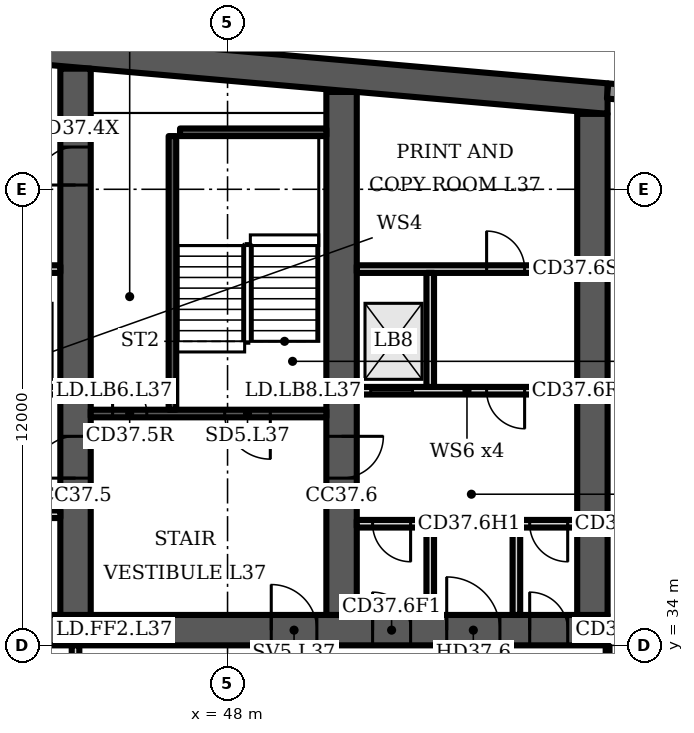
"""IFC4 building model, lengths in metres.
Left out: names, types, materials, properties, quantities, classifications, styles, units other than length and angle.
Written with IfcOpenShell. Run it as: python <this file> out.ifc"""

import sys

from ifc_helpers import new_model, si_unit, direction, frame, frame_2d, origin, place, context, subcontext, project, spatial, polyline, rectangle, outline, extrude, element, fill, save


model = new_model("IFC4")
c1 = context("Model", 3, precision=1e-05, world=origin(), true_north=direction((0.0, 1.0)))
c2 = subcontext(c1, "Body", "Model", "MODEL_VIEW")
j1 = project(units=[si_unit("LENGTHUNIT", "METRE"), si_unit("PLANEANGLEUNIT", "RADIAN")], contexts=[c1])
p1 = place(None, origin())
s1 = spatial("IfcSite", under=j1, at=p1, CompositionType="ELEMENT")
p2 = place(p1, origin())
s2 = spatial("IfcBuilding", under=s1, at=p2, CompositionType="ELEMENT")
p3 = place(p2, frame((0.0, 0.0, 155.5)))
s3 = spatial("IfcBuildingStorey", under=s2, at=p3, CompositionType="ELEMENT", Elevation=155.5)
p4 = place(p3, origin())
e1 = element("IfcWall", 1, at=p4, inside=s3, PredefinedType="SHEAR", context=c2, shape_type="SweptSolid", body=[
    extrude(outline(polyline([(16.0, 47.984), (37.0, 49.822), (58.0, 47.984), (58.0, 48.787), (37.0, 50.625), (16.0, 48.787), (16.0, 47.984)])), origin(), (0.0, 0.0, 1.0), 3.6),
])
p5 = place(p3, frame((16.0, 34.4, 0.0), z_axis=(0.0, 0.0, 1.0), x_axis=(1.0, 0.0, 0.0)))
e2 = element("IfcWall", 2, at=p5, inside=s3, PredefinedType="SHEAR", context=c2, shape_type="SweptSolid", body=[
    extrude(rectangle(XDim=42.0, YDim=0.8, at=frame_2d((21.0, 0.0))), origin(), (0.0, 0.0, 1.0), 3.6),
])
p6 = place(p5, frame((1.75, 0.0, 0.0)))
e3 = element("IfcOpeningElement", 3, at=p6, cuts=e2, PredefinedType="OPENING", context=c2, shape_type="SweptSolid", body=[
    extrude(rectangle(XDim=1.0, YDim=2.1, at=frame_2d((0.5, 1.05))), frame((0.0, 0.41, 0.0), z_axis=(0.0, -1.0, 0.0), x_axis=(1.0, 0.0, 0.0)), (0.0, 0.0, 1.0), 0.82),
])
p7 = place(p5, frame((4.65, 0.0, 0.0)))
e4 = element("IfcOpeningElement", 4, at=p7, cuts=e2, PredefinedType="OPENING", context=c2, shape_type="SweptSolid", body=[
    extrude(rectangle(XDim=1.0, YDim=2.1, at=frame_2d((0.5, 1.05))), frame((0.0, 0.41, 0.0), z_axis=(0.0, -1.0, 0.0), x_axis=(1.0, 0.0, 0.0)), (0.0, 0.0, 1.0), 0.82),
])
p8 = place(p5, frame((7.65, 0.0, 0.0)))
e5 = element("IfcOpeningElement", 5, at=p8, cuts=e2, PredefinedType="OPENING", context=c2, shape_type="SweptSolid", body=[
    extrude(rectangle(XDim=1.2, YDim=2.1, at=frame_2d((0.6, 1.05))), frame((0.0, 0.41, 0.0), z_axis=(0.0, -1.0, 0.0), x_axis=(1.0, 0.0, 0.0)), (0.0, 0.0, 1.0), 0.82),
])
p9 = place(p5, frame((14.767, 0.0, 0.0)))
e6 = element("IfcOpeningElement", 6, at=p9, cuts=e2, PredefinedType="OPENING", context=c2, shape_type="SweptSolid", body=[
    extrude(rectangle(XDim=1.1, YDim=2.1, at=frame_2d((0.55, 1.05))), frame((0.0, 0.41, 0.0), z_axis=(0.0, -1.0, 0.0), x_axis=(1.0, 0.0, 0.0)), (0.0, 0.0, 1.0), 0.82),
])
p10 = place(p5, frame((19.133, 0.0, 0.0)))
e7 = element("IfcOpeningElement", 7, at=p10, cuts=e2, PredefinedType="OPENING", context=c2, shape_type="SweptSolid", body=[
    extrude(rectangle(XDim=1.1, YDim=2.1, at=frame_2d((0.55, 1.05))), frame((0.0, 0.41, 0.0), z_axis=(0.0, -1.0, 0.0), x_axis=(1.0, 0.0, 0.0)), (0.0, 0.0, 1.0), 0.82),
])
p11 = place(p5, frame((16.8, 0.0, 0.0)))
e8 = element("IfcOpeningElement", 8, at=p11, cuts=e2, PredefinedType="OPENING", context=c2, shape_type="SweptSolid", body=[
    extrude(rectangle(XDim=1.4, YDim=2.1, at=frame_2d((0.7, 1.05))), frame((0.0, 0.41, 0.0), z_axis=(0.0, -1.0, 0.0), x_axis=(1.0, 0.0, 0.0)), (0.0, 0.0, 1.0), 0.82),
])
p12 = place(p5, frame((21.767, 0.0, 0.0)))
e9 = element("IfcOpeningElement", 9, at=p12, cuts=e2, PredefinedType="OPENING", context=c2, shape_type="SweptSolid", body=[
    extrude(rectangle(XDim=1.1, YDim=2.1, at=frame_2d((0.55, 1.05))), frame((0.0, 0.41, 0.0), z_axis=(0.0, -1.0, 0.0), x_axis=(1.0, 0.0, 0.0)), (0.0, 0.0, 1.0), 0.82),
])
p13 = place(p5, frame((23.95, 0.0, 0.0)))
e10 = element("IfcOpeningElement", 10, at=p13, cuts=e2, PredefinedType="OPENING", context=c2, shape_type="SweptSolid", body=[
    extrude(rectangle(XDim=1.1, YDim=2.1, at=frame_2d((0.55, 1.05))), frame((0.0, 0.41, 0.0), z_axis=(0.0, -1.0, 0.0), x_axis=(1.0, 0.0, 0.0)), (0.0, 0.0, 1.0), 0.82),
])
p14 = place(p5, frame((26.133, 0.0, 0.0)))
e11 = element("IfcOpeningElement", 11, at=p14, cuts=e2, PredefinedType="OPENING", context=c2, shape_type="SweptSolid", body=[
    extrude(rectangle(XDim=1.1, YDim=2.1, at=frame_2d((0.55, 1.05))), frame((0.0, 0.41, 0.0), z_axis=(0.0, -1.0, 0.0), x_axis=(1.0, 0.0, 0.0)), (0.0, 0.0, 1.0), 0.82),
])
p15 = place(p5, frame((33.15, 0.0, 0.0)))
e12 = element("IfcOpeningElement", 12, at=p15, cuts=e2, PredefinedType="OPENING", context=c2, shape_type="SweptSolid", body=[
    extrude(rectangle(XDim=1.2, YDim=2.1, at=frame_2d((0.6, 1.05))), frame((0.0, 0.41, 0.0), z_axis=(0.0, -1.0, 0.0), x_axis=(1.0, 0.0, 0.0)), (0.0, 0.0, 1.0), 0.82),
])
p16 = place(p5, frame((35.817, 0.0, 0.0)))
e13 = element("IfcOpeningElement", 13, at=p16, cuts=e2, PredefinedType="OPENING", context=c2, shape_type="SweptSolid", body=[
    extrude(rectangle(XDim=1.0, YDim=2.1, at=frame_2d((0.5, 1.05))), frame((0.0, 0.41, 0.0), z_axis=(0.0, -1.0, 0.0), x_axis=(1.0, 0.0, 0.0)), (0.0, 0.0, 1.0), 0.82),
])
p17 = place(p5, frame((39.95, 0.0, 0.0)))
e14 = element("IfcOpeningElement", 14, at=p17, cuts=e2, PredefinedType="OPENING", context=c2, shape_type="SweptSolid", body=[
    extrude(rectangle(XDim=1.0, YDim=2.1, at=frame_2d((0.5, 1.05))), frame((0.0, 0.41, 0.0), z_axis=(0.0, -1.0, 0.0), x_axis=(1.0, 0.0, 0.0)), (0.0, 0.0, 1.0), 0.82),
])
p18 = place(p5, frame((37.767, 0.0, 0.0)))
e15 = element("IfcOpeningElement", 15, at=p18, cuts=e2, PredefinedType="OPENING", context=c2, shape_type="SweptSolid", body=[
    extrude(rectangle(XDim=1.4, YDim=2.1, at=frame_2d((0.7, 1.05))), frame((0.0, 0.41, 0.0), z_axis=(0.0, -1.0, 0.0), x_axis=(1.0, 0.0, 0.0)), (0.0, 0.0, 1.0), 0.82),
])
p19 = place(p3, frame((44.0, 34.8, 0.0), z_axis=(0.0, 0.0, 1.0), x_axis=(0.0, 1.0, 0.0)))
e16 = element("IfcWall", 16, at=p19, inside=s3, PredefinedType="SHEAR", context=c2, shape_type="SweptSolid", body=[
    extrude(rectangle(XDim=14.374, YDim=0.8, at=frame_2d((7.187, 0.0))), origin(), (0.0, 0.0, 1.0), 3.6),
])
p20 = place(p19, frame((11.312, 0.0, 0.0)))
e17 = element("IfcOpeningElement", 17, at=p20, cuts=e16, PredefinedType="OPENING", context=c2, shape_type="SweptSolid", body=[
    extrude(rectangle(XDim=1.0, YDim=2.1, at=frame_2d((0.5, 1.05))), frame((0.0, 0.41, 0.0), z_axis=(0.0, -1.0, 0.0), x_axis=(1.0, 0.0, 0.0)), (0.0, 0.0, 1.0), 0.82),
])
p21 = place(p19, frame((3.6, 0.0, 0.0)))
e18 = element("IfcOpeningElement", 18, at=p21, cuts=e16, PredefinedType="OPENING", context=c2, shape_type="SweptSolid", body=[
    extrude(rectangle(XDim=1.1, YDim=2.1, at=frame_2d((0.55, 1.05))), frame((0.0, 0.41, 0.0), z_axis=(0.0, -1.0, 0.0), x_axis=(1.0, 0.0, 0.0)), (0.0, 0.0, 1.0), 0.82),
])
p22 = place(p3, frame((51.0, 34.8, 0.0), z_axis=(0.0, 0.0, 1.0), x_axis=(0.0, 1.0, 0.0)))
e19 = element("IfcWall", 19, at=p22, inside=s3, PredefinedType="SHEAR", context=c2, shape_type="SweptSolid", body=[
    extrude(rectangle(XDim=13.762, YDim=0.8, at=frame_2d((6.881, 0.0))), origin(), (0.0, 0.0, 1.0), 3.6),
])
p23 = place(p22, frame((3.6, 0.0, 0.0)))
e20 = element("IfcOpeningElement", 20, at=p23, cuts=e19, PredefinedType="OPENING", context=c2, shape_type="SweptSolid", body=[
    extrude(rectangle(XDim=1.1, YDim=2.1, at=frame_2d((0.55, 1.05))), frame((0.0, 0.41, 0.0), z_axis=(0.0, -1.0, 0.0), x_axis=(1.0, 0.0, 0.0)), (0.0, 0.0, 1.0), 0.82),
])
p24 = place(p3, frame((57.6, 34.8, 0.0), z_axis=(0.0, 0.0, 1.0), x_axis=(0.0, 1.0, 0.0)))
e21 = element("IfcWall", 21, at=p24, inside=s3, PredefinedType="SHEAR", context=c2, shape_type="SweptSolid", body=[
    extrude(rectangle(XDim=13.184, YDim=0.8, at=frame_2d((6.592, 0.0))), origin(), (0.0, 0.0, 1.0), 3.6),
])
p25 = place(p3, frame((60.983, 48.326, 0.0), z_axis=(0.0, 0.0, 1.0), x_axis=(-0.996194, 0.087168, 0.0)))
e22 = element("IfcWall", 22, at=p25, inside=s3, PredefinedType="SOLIDWALL", context=c2, shape_type="SweptSolid", body=[
    extrude(rectangle(XDim=2.994, YDim=0.4, at=frame_2d((1.497, 0.0))), origin(), (0.0, 0.0, 1.0), 3.2),
])
p26 = place(p3, frame((37.4, 40.7, 0.0), z_axis=(0.0, 0.0, 1.0), x_axis=(1.0, 0.0, 0.0)))
e23 = element("IfcWall", 23, at=p26, inside=s3, PredefinedType="PARTITIONING", context=c2, shape_type="SweptSolid", body=[
    extrude(rectangle(XDim=6.2, YDim=0.2, at=frame_2d((3.1, 0.0))), origin(), (0.0, 0.0, 1.0), 3.2),
])
p27 = place(p26, frame((0.367, 0.0, 0.0)))
e24 = element("IfcOpeningElement", 24, at=p27, cuts=e23, PredefinedType="OPENING", context=c2, shape_type="SweptSolid", body=[
    extrude(rectangle(XDim=1.1, YDim=2.1, at=frame_2d((0.55, 1.05))), frame((0.0, 0.11, 0.0), z_axis=(0.0, -1.0, 0.0), x_axis=(1.0, 0.0, 0.0)), (0.0, 0.0, 1.0), 0.22),
])
p28 = place(p26, frame((2.55, 0.0, 0.0)))
e25 = element("IfcOpeningElement", 25, at=p28, cuts=e23, PredefinedType="OPENING", context=c2, shape_type="SweptSolid", body=[
    extrude(rectangle(XDim=1.1, YDim=2.1, at=frame_2d((0.55, 1.05))), frame((0.0, 0.11, 0.0), z_axis=(0.0, -1.0, 0.0), x_axis=(1.0, 0.0, 0.0)), (0.0, 0.0, 1.0), 0.22),
])
p29 = place(p26, frame((4.733, 0.0, 0.0)))
e26 = element("IfcOpeningElement", 26, at=p29, cuts=e23, PredefinedType="OPENING", context=c2, shape_type="SweptSolid", body=[
    extrude(rectangle(XDim=1.1, YDim=2.1, at=frame_2d((0.55, 1.05))), frame((0.0, 0.11, 0.0), z_axis=(0.0, -1.0, 0.0), x_axis=(1.0, 0.0, 0.0)), (0.0, 0.0, 1.0), 0.22),
])
p30 = place(p3, frame((0.0, 0.0, -0.0)))
e27 = element("IfcWall", 27, at=p30, inside=s3, PredefinedType="PARTITIONING", context=c2, shape_type="SweptSolid", body=[
    extrude(outline(polyline([(41.567, 37.1), (39.433, 37.1), (39.433, 34.8), (39.233, 34.8), (39.233, 37.65), (37.4, 37.65), (37.4, 37.85), (39.233, 37.85), (39.433, 37.85), (39.433, 37.3), (41.567, 37.3), (41.567, 37.55), (41.767, 37.55), (43.6, 37.55), (43.6, 37.35), (41.767, 37.35), (41.767, 34.8), (41.567, 34.8), (41.567, 37.1)])), origin(), (0.0, 0.0, 1.0), 3.2),
])
p31 = place(p3, frame((0.0, 0.0, -0.0)))
e28 = element("IfcWall", 28, at=p31, inside=s3, PredefinedType="PARTITIONING", context=c2, shape_type="SweptSolid", body=[
    extrude(outline(polyline([(39.433, 40.8), (39.233, 40.8), (39.233, 43.8), (37.4, 43.8), (37.4, 44.0), (43.6, 44.0), (43.6, 43.8), (41.767, 43.8), (41.767, 40.8), (41.567, 40.8), (41.567, 43.8), (39.433, 43.8), (39.433, 40.8)])), origin(), (0.0, 0.0, 1.0), 3.2),
])
p32 = place(p3, frame((44.4, 40.1, 0.0), z_axis=(0.0, 0.0, 1.0), x_axis=(1.0, 0.0, 0.0)))
e29 = element("IfcWall", 29, at=p32, inside=s3, PredefinedType="SHEAR", context=c2, shape_type="SweptSolid", body=[
    extrude(rectangle(XDim=6.2, YDim=0.2, at=frame_2d((3.1, 0.0))), origin(), (0.0, 0.0, 1.0), 3.2),
])
p33 = place(p32, frame((3.525, 0.0, 0.0)))
e30 = element("IfcOpeningElement", 30, at=p33, cuts=e29, PredefinedType="OPENING", context=c2, shape_type="SweptSolid", body=[
    extrude(rectangle(XDim=1.2, YDim=2.1, at=frame_2d((0.6, 1.05))), frame((0.0, 0.11, 0.0), z_axis=(0.0, -1.0, 0.0), x_axis=(1.0, 0.0, 0.0)), (0.0, 0.0, 1.0), 0.22),
])
p34 = place(p32, frame((0.575, 0.0, 0.0)))
e31 = element("IfcOpeningElement", 31, at=p34, cuts=e29, PredefinedType="OPENING", context=c2, shape_type="SweptSolid", body=[
    extrude(rectangle(XDim=0.9, YDim=2.1, at=frame_2d((0.45, 1.05))), frame((0.0, 0.11, 0.0), z_axis=(0.0, -1.0, 0.0), x_axis=(1.0, 0.0, 0.0)), (0.0, 0.0, 1.0), 0.22),
])
p35 = place(p3, frame((46.55, 40.2, 0.0), z_axis=(0.0, 0.0, 1.0), x_axis=(0.0, 1.0, 0.0)))
e32 = element("IfcWall", 32, at=p35, inside=s3, PredefinedType="SHEAR", context=c2, shape_type="SweptSolid", body=[
    extrude(rectangle(XDim=7.2, YDim=0.2, at=frame_2d((3.6, 0.0))), origin(), (0.0, 0.0, 1.0), 3.2),
])
p36 = place(p3, frame((46.75, 47.5, 0.0), z_axis=(0.0, 0.0, 1.0), x_axis=(1.0, 0.0, 0.0)))
e33 = element("IfcWall", 33, at=p36, inside=s3, PredefinedType="SHEAR", context=c2, shape_type="SweptSolid", body=[
    extrude(rectangle(XDim=3.85, YDim=0.2, at=frame_2d((1.925, 0.0))), origin(), (0.0, 0.0, 1.0), 3.2),
])
p37 = place(p3, frame((51.4, 37.2, 0.0), z_axis=(0.0, 0.0, 1.0), x_axis=(1.0, 0.0, 0.0)))
e34 = element("IfcWall", 34, at=p37, inside=s3, PredefinedType="PARTITIONING", context=c2, shape_type="SweptSolid", body=[
    extrude(rectangle(XDim=1.833, YDim=0.2, at=frame_2d((0.917, 0.0))), origin(), (0.0, 0.0, 1.0), 3.2),
])
p38 = place(p37, frame((0.417, 0.0, 0.0)))
e35 = element("IfcOpeningElement", 35, at=p38, cuts=e34, PredefinedType="OPENING", context=c2, shape_type="SweptSolid", body=[
    extrude(rectangle(XDim=1.0, YDim=2.1, at=frame_2d((0.5, 1.05))), frame((0.0, 0.11, 0.0), z_axis=(0.0, -1.0, 0.0), x_axis=(1.0, 0.0, 0.0)), (0.0, 0.0, 1.0), 0.22),
])
p39 = place(p3, frame((55.7, 37.2, 0.0), z_axis=(0.0, 0.0, 1.0), x_axis=(1.0, 0.0, 0.0)))
e36 = element("IfcWall", 36, at=p39, inside=s3, PredefinedType="PARTITIONING", context=c2, shape_type="SweptSolid", body=[
    extrude(rectangle(XDim=1.5, YDim=0.2, at=frame_2d((0.75, 0.0))), origin(), (0.0, 0.0, 1.0), 3.2),
])
p40 = place(p39, frame((0.25, 0.0, 0.0)))
e37 = element("IfcOpeningElement", 37, at=p40, cuts=e36, PredefinedType="OPENING", context=c2, shape_type="SweptSolid", body=[
    extrude(rectangle(XDim=1.0, YDim=2.1, at=frame_2d((0.5, 1.05))), frame((0.0, 0.11, 0.0), z_axis=(0.0, -1.0, 0.0), x_axis=(1.0, 0.0, 0.0)), (0.0, 0.0, 1.0), 0.22),
])
p41 = place(p3, frame((51.4, 40.7, 0.0), z_axis=(0.0, 0.0, 1.0), x_axis=(1.0, 0.0, 0.0)))
e38 = element("IfcWall", 38, at=p41, inside=s3, PredefinedType="PARTITIONING", context=c2, shape_type="SweptSolid", body=[
    extrude(rectangle(XDim=5.8, YDim=0.2, at=frame_2d((2.9, 0.0))), origin(), (0.0, 0.0, 1.0), 3.2),
])
p42 = place(p41, frame((0.367, 0.0, 0.0)))
e39 = element("IfcOpeningElement", 39, at=p42, cuts=e38, PredefinedType="OPENING", context=c2, shape_type="SweptSolid", body=[
    extrude(rectangle(XDim=1.1, YDim=2.1, at=frame_2d((0.55, 1.05))), frame((0.0, 0.11, 0.0), z_axis=(0.0, -1.0, 0.0), x_axis=(1.0, 0.0, 0.0)), (0.0, 0.0, 1.0), 0.22),
])
p43 = place(p41, frame((3.417, 0.0, 0.0)))
e40 = element("IfcOpeningElement", 40, at=p43, cuts=e38, PredefinedType="OPENING", context=c2, shape_type="SweptSolid", body=[
    extrude(rectangle(XDim=1.0, YDim=2.1, at=frame_2d((0.5, 1.05))), frame((0.0, 0.11, 0.0), z_axis=(0.0, -1.0, 0.0), x_axis=(1.0, 0.0, 0.0)), (0.0, 0.0, 1.0), 0.22),
])
p44 = place(p3, frame((51.4, 43.9, 0.0), z_axis=(0.0, 0.0, 1.0), x_axis=(1.0, 0.0, 0.0)))
e41 = element("IfcWall", 41, at=p44, inside=s3, PredefinedType="PARTITIONING", context=c2, shape_type="SweptSolid", body=[
    extrude(rectangle(XDim=5.8, YDim=0.2, at=frame_2d((2.9, 0.0))), origin(), (0.0, 0.0, 1.0), 3.2),
])
p45 = place(p44, frame((3.417, 0.0, 0.0)))
e42 = element("IfcOpeningElement", 42, at=p45, cuts=e41, PredefinedType="OPENING", context=c2, shape_type="SweptSolid", body=[
    extrude(rectangle(XDim=1.0, YDim=2.1, at=frame_2d((0.5, 1.05))), frame((0.0, 0.11, 0.0), z_axis=(0.0, -1.0, 0.0), x_axis=(1.0, 0.0, 0.0)), (0.0, 0.0, 1.0), 0.22),
])
p46 = place(p3, frame((0.0, 0.0, -0.0)))
e43 = element("IfcWall", 43, at=p46, inside=s3, PredefinedType="PARTITIONING", context=c2, shape_type="SweptSolid", body=[
    extrude(outline(polyline([(53.233, 34.8), (53.233, 37.3), (53.433, 37.3), (53.433, 34.8), (53.233, 34.8)])), origin(), (0.0, 0.0, 1.0), 3.2),
])
p47 = place(p3, frame((0.0, 0.0, -0.0)))
e44 = element("IfcWall", 44, at=p47, inside=s3, PredefinedType="PARTITIONING", context=c2, shape_type="SweptSolid", body=[
    extrude(outline(polyline([(55.5, 34.8), (55.5, 37.3), (55.7, 37.3), (55.7, 34.8), (55.5, 34.8)])), origin(), (0.0, 0.0, 1.0), 3.2),
])
p48 = place(p3, frame((0.0, 0.0, -0.0)))
e45 = element("IfcWall", 45, at=p48, inside=s3, PredefinedType="PARTITIONING", context=c2, shape_type="SweptSolid", body=[
    extrude(outline(polyline([(53.433, 40.8), (53.433, 43.8), (53.233, 43.8), (53.233, 40.8), (53.433, 40.8)])), origin(), (0.0, 0.0, 1.0), 3.2),
])
p49 = place(p3, frame((44.0, 30.5, 0.0), z_axis=(0.0, 0.0, 1.0), x_axis=(0.0, 1.0, 0.0)))
e46 = element("IfcWall", 46, at=p49, inside=s3, PredefinedType="PARTITIONING", context=c2, shape_type="SweptSolid", body=[
    extrude(rectangle(XDim=3.5, YDim=0.2, at=frame_2d((1.75, 0.0))), origin(), (0.0, 0.0, 1.0), 3.2),
])
p50 = place(p49, frame((1.2, 0.0, 0.0)))
e47 = element("IfcOpeningElement", 47, at=p50, cuts=e46, PredefinedType="OPENING", context=c2, shape_type="SweptSolid", body=[
    extrude(rectangle(XDim=1.1, YDim=2.1, at=frame_2d((0.55, 1.05))), frame((0.0, 0.11, 0.0), z_axis=(0.0, -1.0, 0.0), x_axis=(1.0, 0.0, 0.0)), (0.0, 0.0, 1.0), 0.22),
])
p51 = place(p3, frame((58.0, 30.5, 0.0), z_axis=(0.0, 0.0, 1.0), x_axis=(0.0, 1.0, 0.0)))
e48 = element("IfcWall", 48, at=p51, inside=s3, PredefinedType="PARTITIONING", context=c2, shape_type="SweptSolid", body=[
    extrude(rectangle(XDim=3.48, YDim=0.1, at=frame_2d((1.74, 0.0))), origin(), (0.0, 0.0, 1.0), 3.2),
])
p52 = place(p20, origin())
e49 = element("IfcDoor", 49, at=p52, inside=s3, OperationType="SINGLE_SWING_LEFT", PredefinedType="DOOR", context=c2, shape_type="SweptSolid", body=[
    extrude(rectangle(XDim=1.0, YDim=2.1, at=frame_2d((0.5, 1.05))), frame((0.0, 0.4, 0.0), z_axis=(0.0, -1.0, 0.0), x_axis=(1.0, 0.0, 0.0)), (0.0, 0.0, 1.0), 0.8),
])
fill(e17, e49)
p53 = place(p33, origin())
e50 = element("IfcDoor", 50, at=p53, inside=s3, OperationType="SINGLE_SWING_RIGHT", PredefinedType="DOOR", context=c2, shape_type="SweptSolid", body=[
    extrude(rectangle(XDim=1.2, YDim=2.1, at=frame_2d((0.6, 1.05))), frame((0.0, 0.025, 0.0), z_axis=(0.0, -1.0, 0.0), x_axis=(1.0, 0.0, 0.0)), (0.0, 0.0, 1.0), 0.05),
])
fill(e30, e50)
p54 = place(p34, origin())
e51 = element("IfcDoor", 51, at=p54, inside=s3, OperationType="SINGLE_SWING_LEFT", PredefinedType="DOOR", context=c2, shape_type="SweptSolid", body=[
    extrude(rectangle(XDim=0.9, YDim=2.1, at=frame_2d((0.45, 1.05))), frame((0.0, 0.025, 0.0), z_axis=(0.0, -1.0, 0.0), x_axis=(1.0, 0.0, 0.0)), (0.0, 0.0, 1.0), 0.05),
])
fill(e31, e51)
p55 = place(p15, origin())
e52 = element("IfcDoor", 52, at=p55, inside=s3, OperationType="SINGLE_SWING_LEFT", PredefinedType="DOOR", context=c2, shape_type="SweptSolid", body=[
    extrude(rectangle(XDim=1.2, YDim=2.1, at=frame_2d((0.6, 1.05))), frame((0.0, 0.025, 0.0), z_axis=(0.0, -1.0, 0.0), x_axis=(1.0, 0.0, 0.0)), (0.0, 0.0, 1.0), 0.05),
])
fill(e12, e52)
p56 = place(p16, origin())
e53 = element("IfcDoor", 53, at=p56, inside=s3, OperationType="SINGLE_SWING_LEFT", PredefinedType="DOOR", context=c2, shape_type="SweptSolid", body=[
    extrude(rectangle(XDim=1.0, YDim=2.1, at=frame_2d((0.5, 1.05))), frame((0.0, 0.4, 0.0), z_axis=(0.0, -1.0, 0.0), x_axis=(1.0, 0.0, 0.0)), (0.0, 0.0, 1.0), 0.8),
])
fill(e13, e53)
p57 = place(p38, origin())
e54 = element("IfcDoor", 54, at=p57, inside=s3, OperationType="SINGLE_SWING_RIGHT", PredefinedType="DOOR", context=c2, shape_type="SweptSolid", body=[
    extrude(rectangle(XDim=1.0, YDim=2.1, at=frame_2d((0.5, 1.05))), frame((0.0, 0.025, 0.0), z_axis=(0.0, -1.0, 0.0), x_axis=(1.0, 0.0, 0.0)), (0.0, 0.0, 1.0), 0.05),
])
fill(e35, e54)
p58 = place(p17, origin())
e55 = element("IfcDoor", 55, at=p58, inside=s3, OperationType="SINGLE_SWING_LEFT", PredefinedType="DOOR", context=c2, shape_type="SweptSolid", body=[
    extrude(rectangle(XDim=1.0, YDim=2.1, at=frame_2d((0.5, 1.05))), frame((0.0, 0.4, 0.0), z_axis=(0.0, -1.0, 0.0), x_axis=(1.0, 0.0, 0.0)), (0.0, 0.0, 1.0), 0.8),
])
fill(e14, e55)
p59 = place(p40, origin())
e56 = element("IfcDoor", 56, at=p59, inside=s3, OperationType="SINGLE_SWING_RIGHT", PredefinedType="DOOR", context=c2, shape_type="SweptSolid", body=[
    extrude(rectangle(XDim=1.0, YDim=2.1, at=frame_2d((0.5, 1.05))), frame((0.0, 0.025, 0.0), z_axis=(0.0, -1.0, 0.0), x_axis=(1.0, 0.0, 0.0)), (0.0, 0.0, 1.0), 0.05),
])
fill(e37, e56)
p60 = place(p18, origin())
e57 = element("IfcDoor", 57, at=p60, inside=s3, OperationType="DOUBLE_DOOR_SINGLE_SWING", PredefinedType="DOOR", context=c2, shape_type="SweptSolid", body=[
    extrude(rectangle(XDim=1.4, YDim=2.1, at=frame_2d((0.7, 1.05))), frame((0.0, 0.025, 0.0), z_axis=(0.0, -1.0, 0.0), x_axis=(1.0, 0.0, 0.0)), (0.0, 0.0, 1.0), 0.05),
])
fill(e15, e57)
p61 = place(p42, origin())
e58 = element("IfcDoor", 58, at=p61, inside=s3, OperationType="DOUBLE_DOOR_SLIDING", PredefinedType="DOOR", context=c2, shape_type="SweptSolid", body=[
    extrude(rectangle(XDim=1.1, YDim=2.1, at=frame_2d((0.55, 1.05))), frame((0.0, 0.025, 0.0), z_axis=(0.0, -1.0, 0.0), x_axis=(1.0, 0.0, 0.0)), (0.0, 0.0, 1.0), 0.05),
])
fill(e39, e58)
p62 = place(p43, origin())
e59 = element("IfcDoor", 59, at=p62, inside=s3, OperationType="SINGLE_SWING_RIGHT", PredefinedType="DOOR", context=c2, shape_type="SweptSolid", body=[
    extrude(rectangle(XDim=1.0, YDim=2.1, at=frame_2d((0.5, 1.05))), frame((0.0, 0.025, 0.0), z_axis=(0.0, -1.0, 0.0), x_axis=(1.0, 0.0, 0.0)), (0.0, 0.0, 1.0), 0.05),
])
fill(e40, e59)
p63 = place(p45, origin())
e60 = element("IfcDoor", 60, at=p63, inside=s3, OperationType="SINGLE_SWING_LEFT", PredefinedType="DOOR", context=c2, shape_type="SweptSolid", body=[
    extrude(rectangle(XDim=1.0, YDim=2.1, at=frame_2d((0.5, 1.05))), frame((0.0, 0.025, 0.0), z_axis=(0.0, -1.0, 0.0), x_axis=(1.0, 0.0, 0.0)), (0.0, 0.0, 1.0), 0.05),
])
fill(e42, e60)
p64 = place(p21, origin())
e61 = element("IfcDoor", 61, at=p64, inside=s3, OperationType="SINGLE_SWING_LEFT", PredefinedType="DOOR", context=c2, shape_type="SweptSolid", body=[
    extrude(rectangle(XDim=1.1, YDim=2.1, at=frame_2d((0.55, 1.05))), frame((0.0, 0.025, 0.0), z_axis=(0.0, -1.0, 0.0), x_axis=(1.0, 0.0, 0.0)), (0.0, 0.0, 1.0), 0.05),
])
fill(e18, e61)
p65 = place(p23, origin())
e62 = element("IfcDoor", 62, at=p65, inside=s3, OperationType="SINGLE_SWING_RIGHT", PredefinedType="DOOR", context=c2, shape_type="SweptSolid", body=[
    extrude(rectangle(XDim=1.1, YDim=2.1, at=frame_2d((0.55, 1.05))), frame((0.0, 0.025, 0.0), z_axis=(0.0, -1.0, 0.0), x_axis=(1.0, 0.0, 0.0)), (0.0, 0.0, 1.0), 0.05),
])
fill(e20, e62)
save(model, sys.argv[1])
